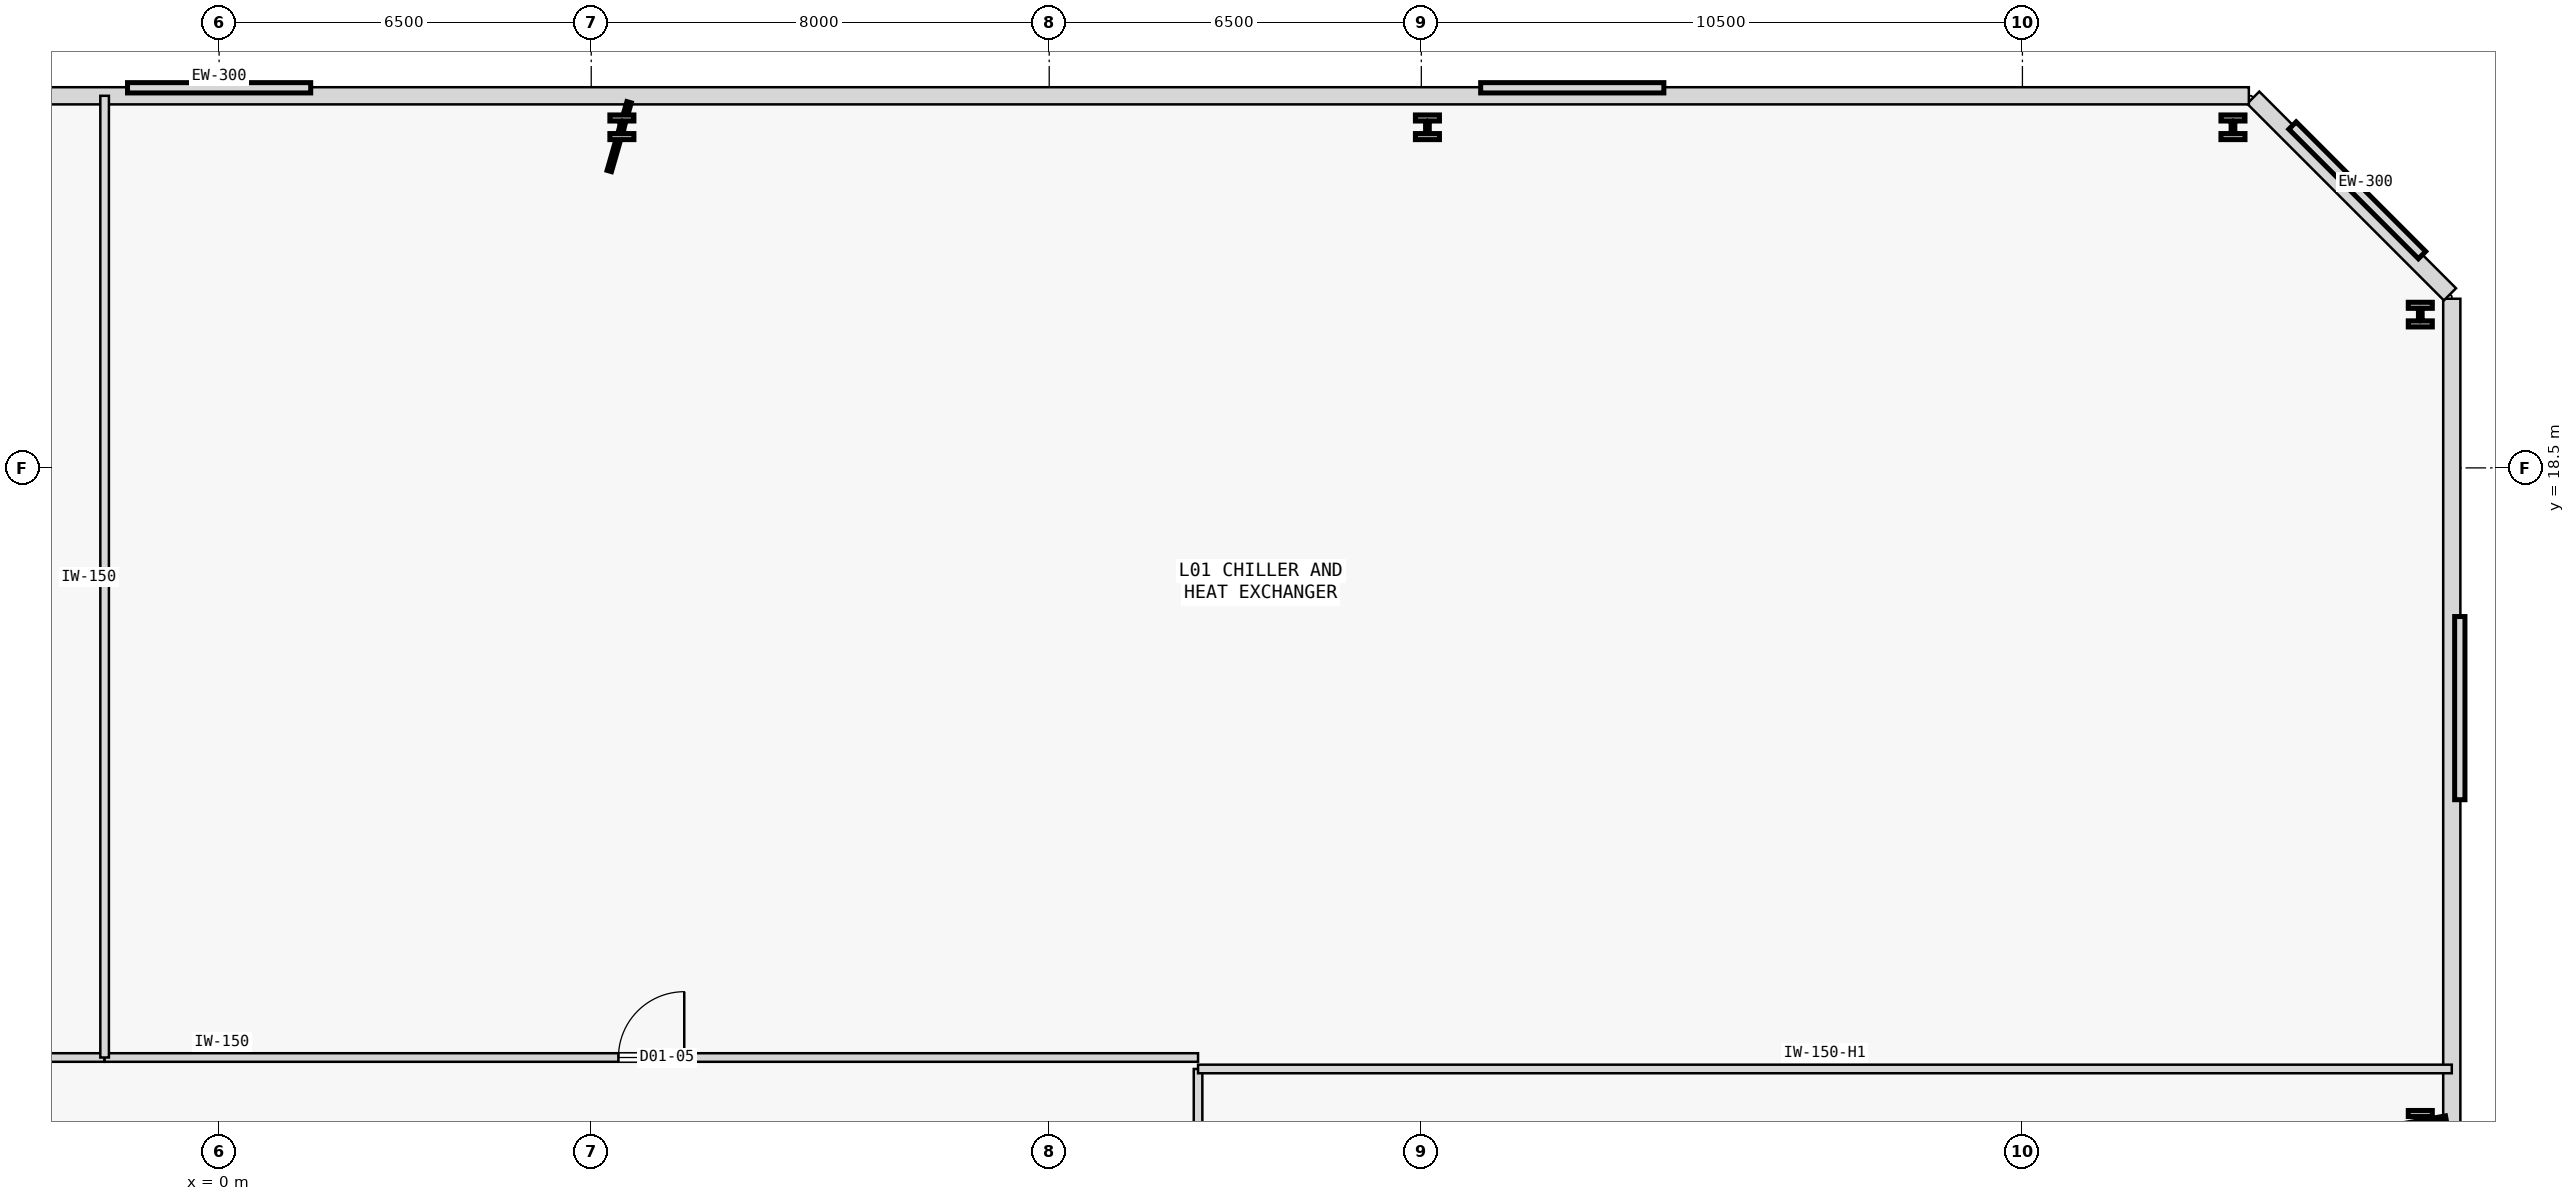
"""IFC4 building model, lengths in metres.
Left out: names, types, materials, properties, quantities, classifications, styles, units other than length and angle.
Written with IfcOpenShell. Run it as: python <this file> out.ifc"""

import sys

from ifc_helpers import new_model, si_unit, direction, frame, frame_2d, origin, origin_2d, place, context, subcontext, project, spatial, rectangle, i_section, extrude, element, fill, save


model = new_model("IFC4")
c1 = context("Model", 3, precision=1e-05, world=origin(), true_north=direction((0.0, 1.0)))
c2 = subcontext(c1, "Body", "Model", "MODEL_VIEW")
j1 = project(units=[si_unit("LENGTHUNIT", "METRE"), si_unit("PLANEANGLEUNIT", "RADIAN")], contexts=[c1])
p1 = place(None, origin())
s1 = spatial("IfcSite", under=j1, at=p1, CompositionType="ELEMENT")
p2 = place(p1, origin())
s2 = spatial("IfcBuilding", under=s1, at=p2, CompositionType="ELEMENT")
p3 = place(p2, frame((0.0, 0.0, 9.6)))
s3 = spatial("IfcBuildingStorey", under=s2, at=p3, CompositionType="ELEMENT", Elevation=9.6)
for number, where, z_axis, x_axis in (
    (1, (38.45, 7.059, 0.0), (0.0, 0.0, 1.0), (1.0, 0.0, 0.0)),
    (2, (38.45, 21.178, 0.0), (0.0, 0.0, 1.0), (1.0, 0.0, 0.0)),
    (3, (35.178, 24.45, 0.0), (0.0, 0.0, 1.0), (1.0, 0.0, 0.0)),
    (4, (21.107, 24.45, 0.0), (0.0, 0.0, 1.0), (1.0, 0.0, 0.0)),
    (5, (7.036, 24.45, 0.0), (0.0, 0.0, 1.0), (1.0, 0.0, 0.0)),
):
    element("IfcColumn", number, at=place(p3, frame(where, z_axis=z_axis, x_axis=x_axis)), inside=s3, PredefinedType="COLUMN", context=c2, shape_type="SweptSolid", body=[
        extrude(i_section(OverallWidth=0.42, OverallDepth=0.431, WebThickness=0.065, FlangeThickness=0.106, FilletRadius=0.015, at=origin_2d()), origin(), (0.0, 0.0, 1.0), 4.6),
    ])
p4 = place(p3, frame((39.0, -21.455, 0.0), z_axis=(0.0, 0.0, 1.0), x_axis=(0.0, 1.0, 0.0)))
e6 = element("IfcWall", 6, at=p4, inside=s3, PredefinedType="STANDARD", context=c2, shape_type="SweptSolid", body=[
    extrude(rectangle(XDim=42.91, YDim=0.3, at=frame_2d((21.455, 0.0))), origin(), (0.0, 0.0, 1.0), 4.375),
])
p5 = place(p3, frame((38.968, 21.532, 0.0), z_axis=(0.0, 0.0, 1.0), x_axis=(-0.707106781187, 0.707106781187, 0.0)))
e7 = element("IfcWall", 7, at=p5, inside=s3, PredefinedType="STANDARD", context=c2, shape_type="SweptSolid", body=[
    extrude(rectangle(XDim=4.86, YDim=0.3, at=frame_2d((2.43, 0.0))), origin(), (0.0, 0.0, 1.0), 4.375),
])
p6 = place(p3, frame((35.455, 25.0, 0.0), z_axis=(0.0, 0.0, 1.0), x_axis=(-1.0, 0.0, 0.0)))
e8 = element("IfcWall", 8, at=p6, inside=s3, PredefinedType="STANDARD", context=c2, shape_type="SweptSolid", body=[
    extrude(rectangle(XDim=70.91, YDim=0.3, at=frame_2d((35.455, 0.0))), origin(), (0.0, 0.0, 1.0), 4.375),
])
p7 = place(p3, frame((-17.0, 8.2, 0.0), z_axis=(0.0, 0.0, 1.0), x_axis=(1.0, 0.0, 0.0)))
e9 = element("IfcWall", 9, at=p7, inside=s3, PredefinedType="PARTITIONING", context=c2, shape_type="SweptSolid", body=[
    extrude(rectangle(XDim=15.0, YDim=0.15, at=frame_2d((7.5, 0.0))), origin(), (0.0, 0.0, 1.0), 4.375),
])
p8 = place(p7, frame((6.925, 0.0, 0.0)))
e10 = element("IfcOpeningElement", 10, at=p8, cuts=e9, PredefinedType="OPENING", context=c2, shape_type="SweptSolid", body=[
    extrude(rectangle(XDim=1.15, YDim=2.15, at=frame_2d((0.575, 1.075))), frame((0.0, 0.085, 0.0), z_axis=(0.0, -1.0, 0.0), x_axis=(1.0, 0.0, 0.0)), (0.0, 0.0, 1.0), 0.17),
])
p9 = place(p3, frame((-2.0, 8.2, 0.0), z_axis=(0.0, 0.0, 1.0), x_axis=(1.0, 0.0, 0.0)))
e11 = element("IfcWall", 11, at=p9, inside=s3, PredefinedType="PARTITIONING", context=c2, shape_type="SweptSolid", body=[
    extrude(rectangle(XDim=19.1, YDim=0.15, at=frame_2d((9.55, 0.0))), origin(), (0.0, 0.0, 1.0), 4.375),
])
p10 = place(p9, frame((8.975, 0.0, 0.0)))
e12 = element("IfcOpeningElement", 12, at=p10, cuts=e11, PredefinedType="OPENING", context=c2, shape_type="SweptSolid", body=[
    extrude(rectangle(XDim=1.15, YDim=2.15, at=frame_2d((0.575, 1.075))), frame((0.0, 0.085, 0.0), z_axis=(0.0, -1.0, 0.0), x_axis=(1.0, 0.0, 0.0)), (0.0, 0.0, 1.0), 0.17),
])
p11 = place(p3, frame((17.1, -8.0, 0.0), z_axis=(0.0, 0.0, 1.0), x_axis=(0.0, 1.0, 0.0)))
e13 = element("IfcWall", 13, at=p11, inside=s3, PredefinedType="PARTITIONING", context=c2, shape_type="SweptSolid", body=[
    extrude(rectangle(XDim=16.0, YDim=0.15, at=frame_2d((8.0, 0.0))), origin(), (0.0, 0.0, 1.0), 4.375),
])
p12 = place(p11, frame((5.025, 0.0, 0.0)))
e14 = element("IfcOpeningElement", 14, at=p12, cuts=e13, PredefinedType="OPENING", context=c2, shape_type="SweptSolid", body=[
    extrude(rectangle(XDim=1.15, YDim=2.15, at=frame_2d((0.575, 1.075))), frame((0.0, 0.085, 0.0), z_axis=(0.0, -1.0, 0.0), x_axis=(1.0, 0.0, 0.0)), (0.0, 0.0, 1.0), 0.17),
])
p13 = place(p3, frame((-2.0, 8.2, 0.0), z_axis=(0.0, 0.0, 1.0), x_axis=(0.0, 1.0, 0.0)))
e15 = element("IfcWall", 15, at=p13, inside=s3, PredefinedType="PARTITIONING", context=c2, shape_type="SweptSolid", body=[
    extrude(rectangle(XDim=16.8, YDim=0.15, at=frame_2d((8.4, 0.0))), origin(), (0.0, 0.0, 1.0), 4.375),
])
p14 = place(p3, frame((17.1, 8.0, 0.0), z_axis=(0.0, 0.0, 1.0), x_axis=(1.0, 0.0, 0.0)))
e16 = element("IfcWall", 16, at=p14, inside=s3, PredefinedType="PARTITIONING", context=c2, shape_type="SweptSolid", body=[
    extrude(rectangle(XDim=21.9, YDim=0.15, at=frame_2d((10.95, 0.0))), origin(), (0.0, 0.0, 1.0), 3.925),
])
p15 = place(p10, origin())
e17 = element("IfcDoor", 17, at=p15, inside=s3, OperationType="SINGLE_SWING_RIGHT", PredefinedType="DOOR", context=c2, shape_type="SweptSolid", body=[
    extrude(rectangle(XDim=1.15, YDim=2.15, at=frame_2d((0.575, 1.075))), frame((0.0, 0.025, 0.0), z_axis=(0.0, -1.0, 0.0), x_axis=(1.0, 0.0, 0.0)), (0.0, 0.0, 1.0), 0.05),
])
fill(e12, e17)
save(model, sys.argv[1])
